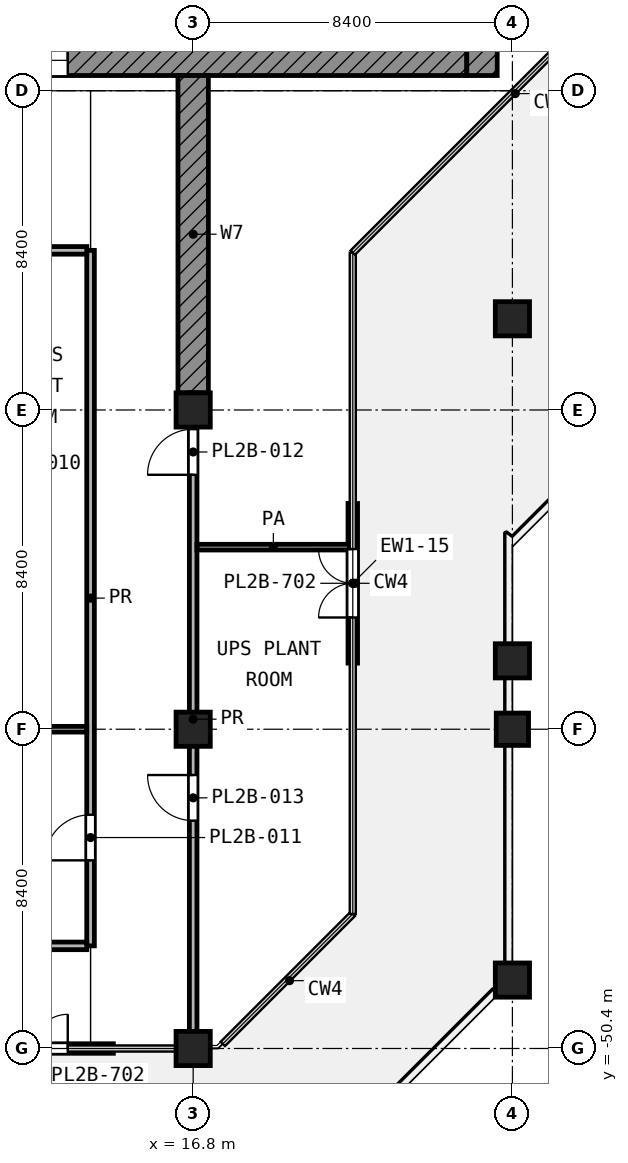
"""IFC4 building model, lengths in metres.
Left out: names, types, materials, properties, quantities, classifications, styles, units other than length and angle.
Written with IfcOpenShell. Run it as: python <this file> out.ifc"""

import sys

from ifc_helpers import new_model, si_unit, direction, frame, frame_2d, origin, origin_2d, place, context, subcontext, project, spatial, rectangle, extrude, element, fill, save


model = new_model("IFC4")
c1 = context("Model", 3, precision=1e-05, world=origin(), true_north=direction((0.0, 1.0)))
c2 = subcontext(c1, "Body", "Model", "MODEL_VIEW")
j1 = project(units=[si_unit("LENGTHUNIT", "METRE"), si_unit("PLANEANGLEUNIT", "RADIAN")], contexts=[c1])
p1 = place(None, origin())
s1 = spatial("IfcSite", under=j1, at=p1, CompositionType="ELEMENT")
p2 = place(p1, origin())
s2 = spatial("IfcBuilding", under=s1, at=p2, CompositionType="ELEMENT")
p3 = place(p2, frame((0.0, 0.0, 213.0)))
s3 = spatial("IfcBuildingStorey", under=s2, at=p3, CompositionType="ELEMENT", Elevation=213.0)
for number, where, z_axis, x_axis in (
    (1, (25.2, -31.2, 0.0), (0.0, 0.0, 1.0), (1.0, 0.0, 0.0)),
    (2, (16.8, -33.6, 0.0), (0.0, 0.0, 1.0), (1.0, 0.0, 0.0)),
    (3, (16.8, -42.0, 0.0), (0.0, 0.0, 1.0), (1.0, 0.0, 0.0)),
):
    element("IfcColumn", number, at=place(p3, frame(where, z_axis=z_axis, x_axis=x_axis)), inside=s3, PredefinedType="COLUMN", context=c2, shape_type="SweptSolid", body=[
        extrude(rectangle(XDim=0.9, YDim=0.9, at=origin_2d()), origin(), (0.0, 0.0, 1.0), 5.0),
    ])
p4 = place(p3, frame((25.2, -42.0, 0.0), z_axis=(0.0, 0.0, 1.0), x_axis=(1.0, 0.0, 0.0)))
e4 = element("IfcColumn", 4, at=p4, inside=s3, PredefinedType="COLUMN", context=c2, shape_type="SweptSolid", body=[
    extrude(rectangle(XDim=0.85, YDim=0.85, at=origin_2d()), origin(), (0.0, 0.0, 1.0), 5.0),
])
for number, where, z_axis, x_axis in (
    (5, (25.2, -48.6, 0.0), (0.0, 0.0, 1.0), (1.0, 0.0, 0.0)),
    (6, (16.8, -50.4, 0.0), (0.0, 0.0, 1.0), (1.0, 0.0, 0.0)),
    (7, (25.2, -40.2, 0.0), (0.0, 0.0, 1.0), (1.0, 0.0, 0.0)),
):
    element("IfcColumn", number, at=place(p3, frame(where, z_axis=z_axis, x_axis=x_axis)), inside=s3, PredefinedType="COLUMN", context=c2, shape_type="SweptSolid", body=[
        extrude(rectangle(XDim=0.9, YDim=0.9, at=origin_2d()), origin(), (0.0, 0.0, 1.0), 5.0),
    ])
p5 = place(p3, frame((16.8, -24.8, 0.0), z_axis=(0.0, 0.0, 1.0), x_axis=(0.0, -1.0, 0.0)))
e8 = element("IfcWall", 8, at=p5, inside=s3, PredefinedType="SHEAR", context=c2, shape_type="SweptSolid", body=[
    extrude(rectangle(XDim=8.35, YDim=0.8, at=frame_2d((4.175, 0.0))), origin(), (0.0, 0.0, 1.0), 4.4),
])
p6 = place(p3, frame((10.5, -50.401, 0.0), z_axis=(0.0, 0.0, 1.0), x_axis=(1.0, 0.0, 0.0)))
e9 = element("IfcWall", 9, at=p6, inside=s3, PredefinedType="SOLIDWALL", context=c2, shape_type="SweptSolid", body=[
    extrude(rectangle(XDim=4.2, YDim=0.25, at=frame_2d((2.1, 0.0))), origin(), (0.0, 0.0, 1.0), 4.24),
])
p7 = place(p6, frame((1.2, 0.0, 0.0)))
e10 = element("IfcOpeningElement", 10, at=p7, cuts=e9, PredefinedType="OPENING", context=c2, shape_type="SweptSolid", body=[
    extrude(rectangle(XDim=1.8, YDim=2.1, at=frame_2d((0.9, 1.05))), frame((0.0, 0.135, 0.0), z_axis=(0.0, -1.0, 0.0), x_axis=(1.0, 0.0, 0.0)), (0.0, 0.0, 1.0), 0.27),
])
p8 = place(p3, frame((21.0, -40.26, 0.0), z_axis=(0.0, 0.0, 1.0), x_axis=(0.0, 1.0, 0.0)))
e11 = element("IfcWall", 11, at=p8, inside=s3, PredefinedType="SOLIDWALL", context=c2, shape_type="SweptSolid", body=[
    extrude(rectangle(XDim=4.2, YDim=0.25, at=frame_2d((2.1, 0.0))), origin(), (0.0, 0.0, 1.0), 4.24),
])
p9 = place(p8, frame((1.2, 0.0, 0.0)))
e12 = element("IfcOpeningElement", 12, at=p9, cuts=e11, PredefinedType="OPENING", context=c2, shape_type="SweptSolid", body=[
    extrude(rectangle(XDim=1.8, YDim=2.1, at=frame_2d((0.9, 1.05))), frame((0.0, 0.135, 0.0), z_axis=(0.0, -1.0, 0.0), x_axis=(1.0, 0.0, 0.0)), (0.0, 0.0, 1.0), 0.27),
])
p10 = place(p3, frame((5.4, -24.4, 0.0), z_axis=(0.0, 0.0, 1.0), x_axis=(1.0, 0.0, 0.0)))
e13 = element("IfcWall", 13, at=p10, inside=s3, PredefinedType="SHEAR", context=c2, shape_type="SweptSolid", body=[
    extrude(rectangle(XDim=18.6, YDim=0.8, at=frame_2d((9.3, 0.0))), origin(), (0.0, 0.0, 1.0), 4.4),
])
p11 = place(p10, frame((6.3, 0.0, 0.0)))
e14 = element("IfcOpeningElement", 14, at=p11, cuts=e13, PredefinedType="OPENING", context=c2, shape_type="SweptSolid", body=[
    extrude(rectangle(XDim=1.8, YDim=2.1, at=frame_2d((0.9, 1.05))), frame((0.0, 0.41, 0.0), z_axis=(0.0, -1.0, 0.0), x_axis=(1.0, 0.0, 0.0)), (0.0, 0.0, 1.0), 0.82),
])
p12 = place(p3, frame((24.4, -24.8, 0.0), z_axis=(0.0, 0.0, 1.0), x_axis=(0.0, 1.0, 0.0)))
e15 = element("IfcWall", 15, at=p12, inside=s3, PredefinedType="SHEAR", context=c2, shape_type="SweptSolid", body=[
    extrude(rectangle(XDim=0.8, YDim=0.8, at=frame_2d((0.4, 0.0))), origin(), (0.0, 0.0, 1.0), 4.4),
])
p13 = place(p3, frame((11.2, -42.0, 0.0), z_axis=(0.0, 0.0, 1.0), x_axis=(1.0, 0.0, 0.0)))
e16 = element("IfcWall", 16, at=p13, inside=s3, PredefinedType="PARTITIONING", context=c2, shape_type="SweptSolid", body=[
    extrude(rectangle(XDim=2.8, YDim=0.15, at=frame_2d((1.4, 0.0))), origin(), (0.0, 0.0, 1.0), 4.4),
])
p14 = place(p3, frame((16.9, -37.209, 0.0), z_axis=(0.0, 0.0, 1.0), x_axis=(1.0, 0.0, 0.0)))
e17 = element("IfcWall", 17, at=p14, inside=s3, PredefinedType="PARTITIONING", context=c2, shape_type="SweptSolid", body=[
    extrude(rectangle(XDim=4.02, YDim=0.15, at=frame_2d((2.01, 0.0))), origin(), (0.0, 0.0, 1.0), 4.4),
])
for number, where, z_axis, x_axis in (
    (18, (11.203, -47.7, 0.0), (0.0, 0.0, 1.0), (1.0, 0.0, 0.0)),
    (19, (11.203, -29.4, 0.0), (0.0, 0.0, 1.0), (1.0, 0.0, 0.0)),
):
    element("IfcWall", number, at=place(p3, frame(where, z_axis=z_axis, x_axis=x_axis)), inside=s3, PredefinedType="PARTITIONING", context=c2, shape_type="SweptSolid", body=[
        extrude(rectangle(XDim=2.797, YDim=0.2, at=frame_2d((1.398, 0.0))), origin(), (0.0, 0.0, 1.0), 4.4),
    ])
p15 = place(p3, frame((14.1, -47.7, 0.0), z_axis=(0.0, 0.0, 1.0), x_axis=(0.0, 1.0, 0.0)))
e20 = element("IfcWall", 20, at=p15, inside=s3, PredefinedType="PARTITIONING", context=c2, shape_type="SweptSolid", body=[
    extrude(rectangle(XDim=18.3, YDim=0.2, at=frame_2d((9.15, 0.0))), origin(), (0.0, 0.0, 1.0), 4.4),
])
p16 = place(p15, frame((2.25, 0.0, 0.0)))
e21 = element("IfcOpeningElement", 21, at=p16, cuts=e20, PredefinedType="OPENING", context=c2, shape_type="SweptSolid", body=[
    extrude(rectangle(XDim=1.2, YDim=2.1, at=frame_2d((0.6, 1.05))), frame((0.0, 0.11, 0.0), z_axis=(0.0, -1.0, 0.0), x_axis=(1.0, 0.0, 0.0)), (0.0, 0.0, 1.0), 0.22),
])
p17 = place(p3, frame((16.8, -50.321, 0.0), z_axis=(0.0, 0.0, 1.0), x_axis=(0.0, 1.0, 0.0)))
e22 = element("IfcWall", 22, at=p17, inside=s3, PredefinedType="PARTITIONING", context=c2, shape_type="SweptSolid", body=[
    extrude(rectangle(XDim=17.171, YDim=0.2, at=frame_2d((8.585, 0.0))), origin(), (0.0, 0.0, 1.0), 4.4),
])
p18 = place(p17, frame((15.016, 0.0, 0.0)))
e23 = element("IfcOpeningElement", 23, at=p18, cuts=e22, PredefinedType="OPENING", context=c2, shape_type="SweptSolid", body=[
    extrude(rectangle(XDim=1.2, YDim=2.1, at=frame_2d((0.6, 1.05))), frame((0.0, 0.11, 0.0), z_axis=(0.0, -1.0, 0.0), x_axis=(1.0, 0.0, 0.0)), (0.0, 0.0, 1.0), 0.22),
])
p19 = place(p17, frame((5.916, 0.0, 0.0)))
e24 = element("IfcOpeningElement", 24, at=p19, cuts=e22, PredefinedType="OPENING", context=c2, shape_type="SweptSolid", body=[
    extrude(rectangle(XDim=1.2, YDim=2.1, at=frame_2d((0.6, 1.05))), frame((0.0, 0.11, 0.0), z_axis=(0.0, -1.0, 0.0), x_axis=(1.0, 0.0, 0.0)), (0.0, 0.0, 1.0), 0.22),
])
p20 = place(p7, origin())
e25 = element("IfcDoor", 25, at=p20, inside=s3, OperationType="DOUBLE_DOOR_SINGLE_SWING", PredefinedType="DOOR", context=c2, shape_type="SweptSolid", body=[
    extrude(rectangle(XDim=1.8, YDim=2.1, at=frame_2d((0.9, 1.05))), frame((0.0, 0.025, 0.0), z_axis=(0.0, -1.0, 0.0), x_axis=(1.0, 0.0, 0.0)), (0.0, 0.0, 1.0), 0.05),
])
fill(e10, e25)
p21 = place(p9, origin())
e26 = element("IfcDoor", 26, at=p21, inside=s3, OperationType="DOUBLE_DOOR_SINGLE_SWING", PredefinedType="DOOR", context=c2, shape_type="SweptSolid", body=[
    extrude(rectangle(XDim=1.8, YDim=2.1, at=frame_2d((0.9, 1.05))), frame((0.0, 0.025, 0.0), z_axis=(0.0, -1.0, 0.0), x_axis=(1.0, 0.0, 0.0)), (0.0, 0.0, 1.0), 0.05),
])
fill(e12, e26)
p22 = place(p11, origin())
e27 = element("IfcDoor", 27, at=p22, inside=s3, OperationType="DOUBLE_DOOR_SINGLE_SWING", PredefinedType="DOOR", context=c2, shape_type="SweptSolid", body=[
    extrude(rectangle(XDim=1.8, YDim=2.1, at=frame_2d((0.9, 1.05))), frame((0.0, 0.025, 0.0), z_axis=(0.0, -1.0, 0.0), x_axis=(1.0, 0.0, 0.0)), (0.0, 0.0, 1.0), 0.05),
])
fill(e14, e27)
p23 = place(p16, origin())
e28 = element("IfcDoor", 28, at=p23, inside=s3, OperationType="SINGLE_SWING_LEFT", PredefinedType="DOOR", context=c2, shape_type="SweptSolid", body=[
    extrude(rectangle(XDim=1.2, YDim=2.1, at=frame_2d((0.6, 1.05))), frame((0.0, 0.025, 0.0), z_axis=(0.0, -1.0, 0.0), x_axis=(1.0, 0.0, 0.0)), (0.0, 0.0, 1.0), 0.05),
])
fill(e21, e28)
p24 = place(p18, origin())
e29 = element("IfcDoor", 29, at=p24, inside=s3, OperationType="SINGLE_SWING_LEFT", PredefinedType="DOOR", context=c2, shape_type="SweptSolid", body=[
    extrude(rectangle(XDim=1.2, YDim=2.1, at=frame_2d((0.6, 1.05))), frame((0.0, 0.025, 0.0), z_axis=(0.0, -1.0, 0.0), x_axis=(1.0, 0.0, 0.0)), (0.0, 0.0, 1.0), 0.05),
])
fill(e23, e29)
p25 = place(p19, origin())
e30 = element("IfcDoor", 30, at=p25, inside=s3, OperationType="SINGLE_SWING_RIGHT", PredefinedType="DOOR", context=c2, shape_type="SweptSolid", body=[
    extrude(rectangle(XDim=1.2, YDim=2.1, at=frame_2d((0.6, 1.05))), frame((0.0, 0.025, 0.0), z_axis=(0.0, -1.0, 0.0), x_axis=(1.0, 0.0, 0.0)), (0.0, 0.0, 1.0), 0.05),
])
fill(e24, e30)
save(model, sys.argv[1])
